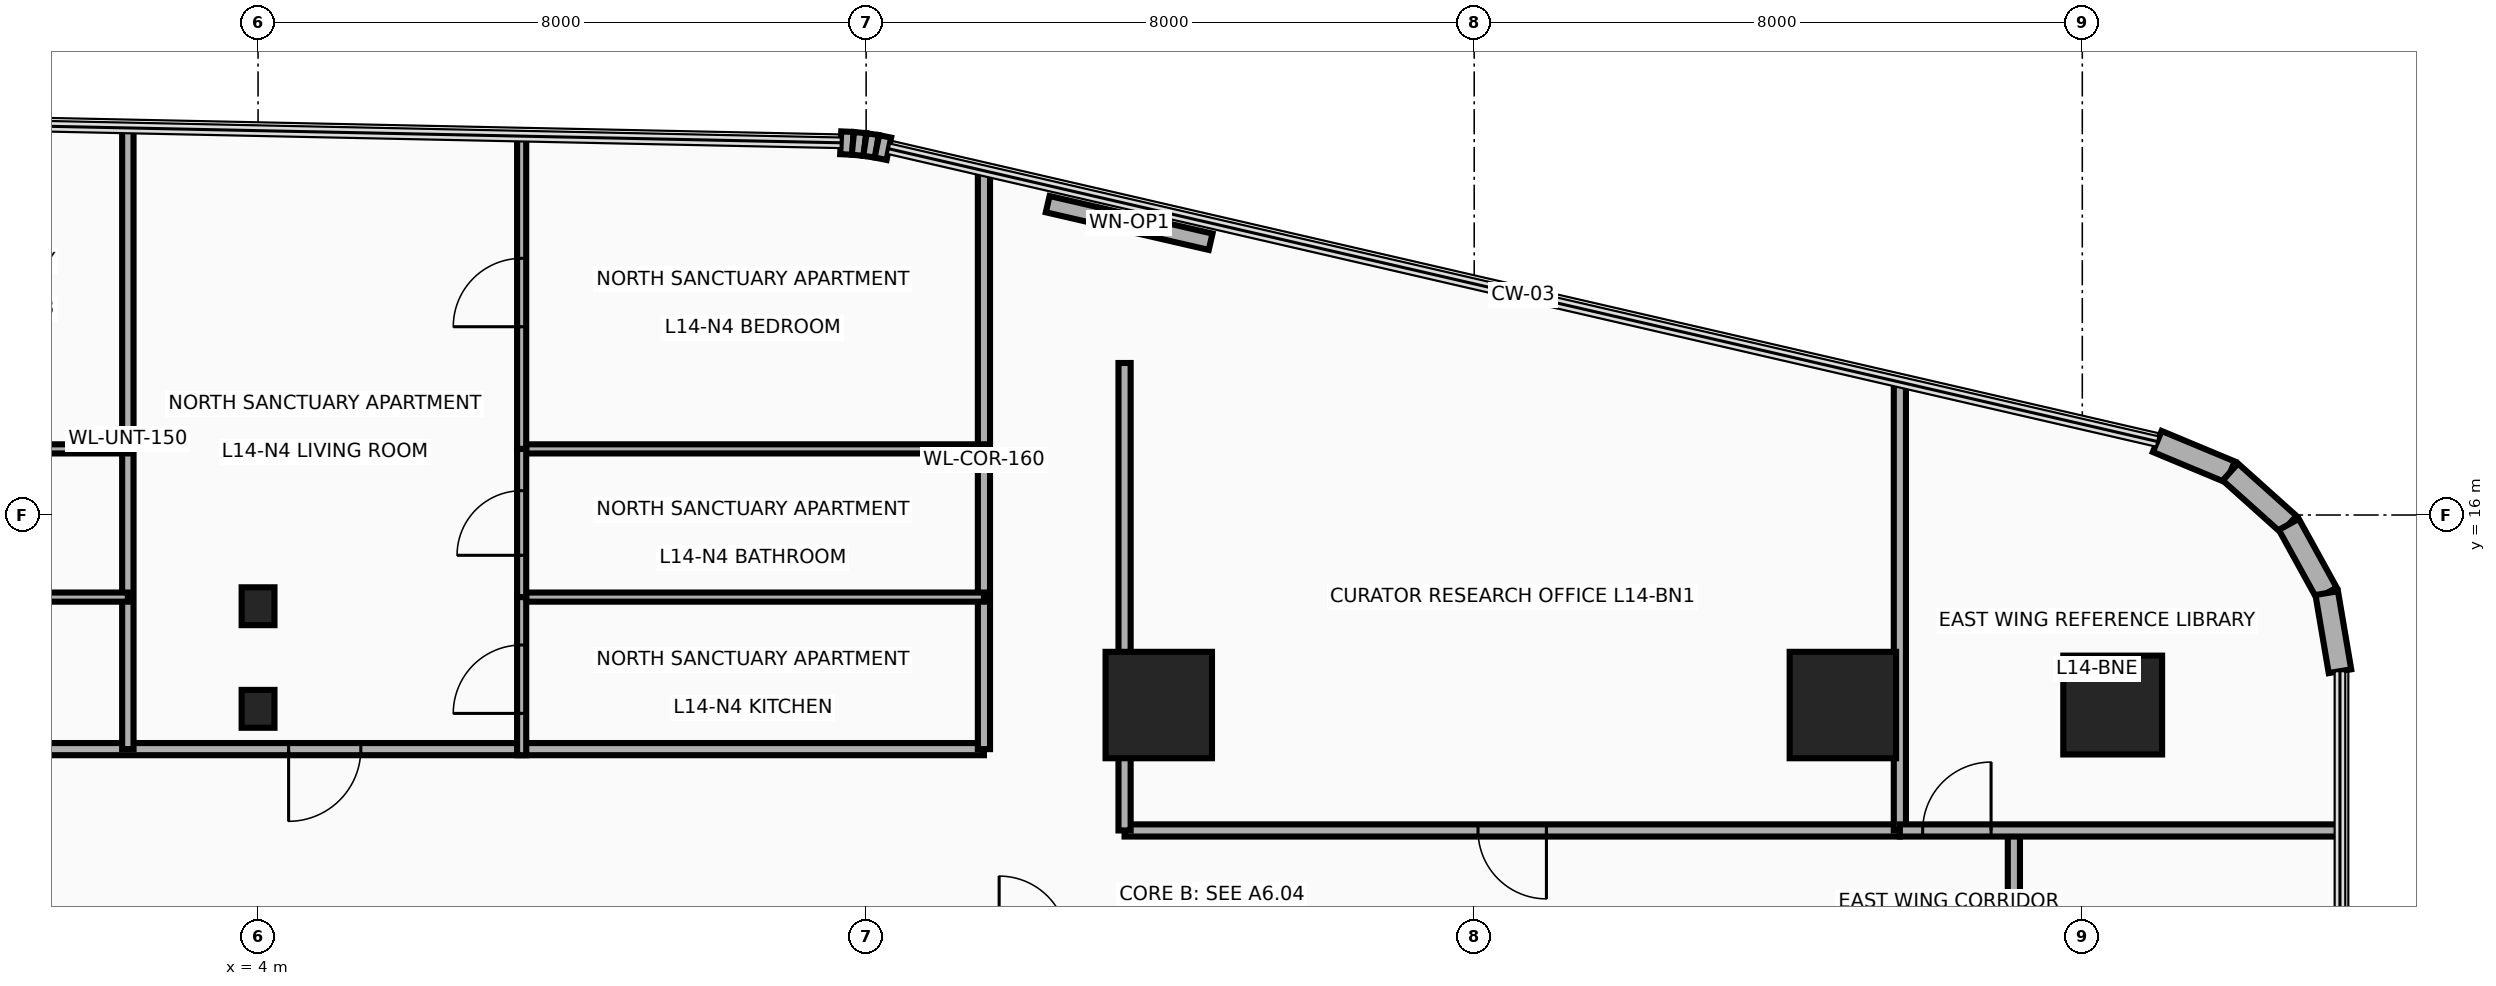
"""IFC4 building model, lengths in metres.
Left out: names, types, materials, properties, quantities, classifications, styles, units other than length and angle.
Written with IfcOpenShell. Run it as: python <this file> out.ifc"""

import sys

from ifc_helpers import new_model, si_unit, direction, frame, frame_2d, origin, origin_2d, place, context, subcontext, project, spatial, rectangle, circle, i_section, extrude, source, transform, mapped, element, fill, save


model = new_model("IFC4")
c1 = context("Model", 3, precision=1e-05, world=origin(), true_north=direction((0.0, 1.0)))
c2 = subcontext(c1, "Body", "Model", "MODEL_VIEW")
j1 = project(units=[si_unit("LENGTHUNIT", "METRE"), si_unit("PLANEANGLEUNIT", "RADIAN")], contexts=[c1])
p1 = place(None, origin())
s1 = spatial("IfcSite", under=j1, at=p1, CompositionType="ELEMENT")
p2 = place(p1, origin())
s2 = spatial("IfcBuilding", under=s1, at=p2, CompositionType="ELEMENT")
p3 = place(p2, frame((0.0, 0.0, 59.3)))
s3 = spatial("IfcBuildingStorey", under=s2, at=p3, CompositionType="ELEMENT", Elevation=59.3)
m1 = source(origin(), c2, "Body", "SweptSolid", [
    extrude(rectangle(XDim=1.4, YDim=1.4, at=origin_2d()), origin(), (0.0, 0.0, 1.0), 3.7),
])
for number, where, z_axis, x_axis in (
    (1, (15.85, 13.5, 0.0), (0.0, 0.0, 1.0), (1.0, 0.0, 0.0)),
    (2, (24.85, 13.5, 0.0), (0.0, 0.0, 1.0), (1.0, 0.0, 0.0)),
):
    element("IfcColumn", number, at=place(p3, frame(where, z_axis=z_axis, x_axis=x_axis)), inside=s3, PredefinedType="COLUMN", context=c2, shape_type="MappedRepresentation", body=[
        mapped(m1, transform((0.0, 0.0, 0.0), x_axis=(1.0, 0.0, 0.0), y_axis=(0.0, 1.0, 0.0), z_axis=(0.0, 0.0, 1.0), scale=1.0)),
    ])
m2 = source(origin(), c2, "Body", "SweptSolid", [
    extrude(circle(Radius=0.65, at=origin_2d()), origin(), (0.0, 0.0, 1.0), 3.7),
])
p4 = place(p3, frame((28.4, 13.5, 0.0), z_axis=(0.0, 0.0, 1.0), x_axis=(1.0, 0.0, 0.0)))
e3 = element("IfcColumn", 3, at=p4, inside=s3, PredefinedType="COLUMN", context=c2, shape_type="MappedRepresentation", body=[
    mapped(m2, transform((0.0, 0.0, 0.0), x_axis=(1.0, 0.0, 0.0), y_axis=(0.0, 1.0, 0.0), z_axis=(0.0, 0.0, 1.0), scale=1.0)),
])
m3 = source(origin(), c2, "Body", "SweptSolid", [
    extrude(i_section(OverallWidth=0.432, OverallDepth=0.498, WebThickness=0.056, FlangeThickness=0.089, at=origin_2d()), origin(), (0.0, 0.0, 1.0), 3.7),
])
for number, where, z_axis, x_axis in (
    (4, (4.0, 13.45, 0.0), (0.0, 0.0, 1.0), (1.0, 0.0, 0.0)),
    (5, (4.0, 14.8, 0.0), (0.0, 0.0, 1.0), (1.0, 0.0, 0.0)),
):
    element("IfcColumn", number, at=place(p3, frame(where, z_axis=z_axis, x_axis=x_axis)), inside=s3, PredefinedType="COLUMN", context=c2, shape_type="MappedRepresentation", body=[
        mapped(m3, transform((0.0, 0.0, 0.0), x_axis=(1.0, 0.0, 0.0), y_axis=(0.0, 1.0, 0.0), z_axis=(0.0, 0.0, 1.0), scale=1.0)),
    ])
p5 = place(p3, frame((11.666, 20.897, 0.0), z_axis=(0.0, 0.0, 1.0), x_axis=(0.998885297239, -0.047203421059, 0.0)))
e6 = element("IfcWall", 6, at=p5, inside=s3, PredefinedType="SOLIDWALL", context=c2, shape_type="SweptSolid", body=[
    extrude(rectangle(XDim=0.16, YDim=0.3, at=frame_2d((0.08, 0.0))), origin(), (0.0, 0.0, 1.0), 3.46),
])
p6 = place(p3, frame((11.826, 20.889, 0.0), z_axis=(0.0, 0.0, 1.0), x_axis=(0.995172891136, -0.098137234257, 0.0)))
e7 = element("IfcWall", 7, at=p6, inside=s3, PredefinedType="SOLIDWALL", context=c2, shape_type="SweptSolid", body=[
    extrude(rectangle(XDim=0.159, YDim=0.3, at=frame_2d((0.08, 0.0))), origin(), (0.0, 0.0, 1.0), 3.46),
])
p7 = place(p3, frame((11.984, 20.874, 0.0), z_axis=(0.0, 0.0, 1.0), x_axis=(0.988846069207, -0.148941100486, 0.0)))
e8 = element("IfcWall", 8, at=p7, inside=s3, PredefinedType="SOLIDWALL", context=c2, shape_type="SweptSolid", body=[
    extrude(rectangle(XDim=0.159, YDim=0.3, at=frame_2d((0.08, 0.0))), origin(), (0.0, 0.0, 1.0), 3.46),
])
p8 = place(p3, frame((12.142, 20.85, 0.0), z_axis=(0.0, 0.0, 1.0), x_axis=(0.979991950448, -0.19903712482, 0.0)))
e9 = element("IfcWall", 9, at=p8, inside=s3, PredefinedType="SOLIDWALL", context=c2, shape_type="SweptSolid", body=[
    extrude(rectangle(XDim=0.161, YDim=0.3, at=frame_2d((0.08, 0.0))), origin(), (0.0, 0.0, 1.0), 3.46),
])
p9 = place(p3, frame((14.389, 20.09, 0.0), z_axis=(0.0, 0.0, 1.0), x_axis=(0.974400545997, -0.224818984875, 0.0)))
e10 = element("IfcWall", 10, at=p9, inside=s3, PredefinedType="SOLIDWALL", context=c2, shape_type="SweptSolid", body=[
    extrude(rectangle(XDim=2.2, YDim=0.22, at=frame_2d((1.1, 0.0))), origin(), (0.0, 0.0, 1.0), 3.46),
])
p10 = place(p9, frame((0.65, 0.0, 0.95)))
e11 = element("IfcOpeningElement", 11, at=p10, cuts=e10, PredefinedType="OPENING", context=c2, shape_type="SweptSolid", body=[
    extrude(rectangle(XDim=0.9, YDim=1.3, at=frame_2d((0.45, 0.65))), frame((0.0, 0.125, 0.0), z_axis=(0.0, -1.0, 0.0), x_axis=(1.0, 0.0, 0.0)), (0.0, 0.0, 1.0), 0.25),
])
p11 = place(p3, frame((28.986, 16.967, 0.0), z_axis=(0.0, 0.0, 1.0), x_axis=(0.923083852684, -0.384598753136, 0.0)))
e12 = element("IfcWall", 12, at=p11, inside=s3, PredefinedType="SOLIDWALL", context=c2, shape_type="SweptSolid", body=[
    extrude(rectangle(XDim=1.042, YDim=0.3, at=frame_2d((0.521, 0.0))), origin(), (0.0, 0.0, 1.0), 3.46),
])
p12 = place(p3, frame((29.948, 16.566, 0.0), z_axis=(0.0, 0.0, 1.0), x_axis=(0.744585645533, -0.66752694063, 0.0)))
e13 = element("IfcWall", 13, at=p12, inside=s3, PredefinedType="SOLIDWALL", context=c2, shape_type="SweptSolid", body=[
    extrude(rectangle(XDim=1.033, YDim=0.3, at=frame_2d((0.517, 0.0))), origin(), (0.0, 0.0, 1.0), 3.46),
])
p13 = place(p3, frame((30.717, 15.877, 0.0), z_axis=(0.0, 0.0, 1.0), x_axis=(0.482971098131, -0.875636293429, 0.0)))
e14 = element("IfcWall", 14, at=p13, inside=s3, PredefinedType="SOLIDWALL", context=c2, shape_type="SweptSolid", body=[
    extrude(rectangle(XDim=1.033, YDim=0.3, at=frame_2d((0.516, 0.0))), origin(), (0.0, 0.0, 1.0), 3.46),
])
p14 = place(p3, frame((31.216, 14.973, 0.0), z_axis=(0.0, 0.0, 1.0), x_axis=(0.167019462117, -0.985953598946, 0.0)))
e15 = element("IfcWall", 15, at=p14, inside=s3, PredefinedType="SOLIDWALL", context=c2, shape_type="SweptSolid", body=[
    extrude(rectangle(XDim=1.042, YDim=0.3, at=frame_2d((0.521, 0.0))), origin(), (0.0, 0.0, 1.0), 3.46),
])
p15 = place(p3, frame((-31.89, 12.92, 0.0), z_axis=(0.0, 0.0, 1.0), x_axis=(1.0, 0.0, 0.0)))
e16 = element("IfcWall", 16, at=p15, inside=s3, PredefinedType="PARTITIONING", context=c2, shape_type="SweptSolid", body=[
    extrude(rectangle(XDim=45.44, YDim=0.16, at=frame_2d((22.72, 0.0))), origin(), (0.0, 0.0, 1.0), 2.583),
])
p16 = place(p15, frame((2.88, 0.0, 0.0)))
e17 = element("IfcOpeningElement", 17, at=p16, cuts=e16, PredefinedType="OPENING", context=c2, shape_type="SweptSolid", body=[
    extrude(rectangle(XDim=0.95, YDim=2.15, at=frame_2d((0.475, 1.075))), frame((0.0, 0.095, 0.0), z_axis=(0.0, -1.0, 0.0), x_axis=(1.0, 0.0, 0.0)), (0.0, 0.0, 1.0), 0.19),
])
p17 = place(p15, frame((13.768, 0.0, 0.0)))
e18 = element("IfcOpeningElement", 18, at=p17, cuts=e16, PredefinedType="OPENING", context=c2, shape_type="SweptSolid", body=[
    extrude(rectangle(XDim=0.95, YDim=2.15, at=frame_2d((0.475, 1.075))), frame((0.0, 0.095, 0.0), z_axis=(0.0, -1.0, 0.0), x_axis=(1.0, 0.0, 0.0)), (0.0, 0.0, 1.0), 0.19),
])
p18 = place(p15, frame((25.855, 0.0, 0.0)))
e19 = element("IfcOpeningElement", 19, at=p18, cuts=e16, PredefinedType="OPENING", context=c2, shape_type="SweptSolid", body=[
    extrude(rectangle(XDim=0.95, YDim=2.15, at=frame_2d((0.475, 1.075))), frame((0.0, 0.095, 0.0), z_axis=(0.0, -1.0, 0.0), x_axis=(1.0, 0.0, 0.0)), (0.0, 0.0, 1.0), 0.19),
])
p19 = place(p15, frame((36.292, 0.0, 0.0)))
e20 = element("IfcOpeningElement", 20, at=p19, cuts=e16, PredefinedType="OPENING", context=c2, shape_type="SweptSolid", body=[
    extrude(rectangle(XDim=0.95, YDim=2.15, at=frame_2d((0.475, 1.075))), frame((0.0, 0.095, 0.0), z_axis=(0.0, -1.0, 0.0), x_axis=(1.0, 0.0, 0.0)), (0.0, 0.0, 1.0), 0.19),
])
p20 = place(p3, frame((13.55, 12.92, 0.0), z_axis=(0.0, 0.0, 1.0), x_axis=(0.0, 1.0, 0.0)))
e21 = element("IfcWall", 21, at=p20, inside=s3, PredefinedType="PARTITIONING", context=c2, shape_type="SweptSolid", body=[
    extrude(rectangle(XDim=7.609, YDim=0.16, at=frame_2d((3.805, 0.0))), origin(), (0.0, 0.0, 1.0), 2.583),
])
p21 = place(p3, frame((2.287, 12.92, 0.0), z_axis=(0.0, 0.0, 1.0), x_axis=(0.0, 1.0, 0.0)))
e22 = element("IfcWall", 22, at=p21, inside=s3, PredefinedType="PARTITIONING", context=c2, shape_type="SweptSolid", body=[
    extrude(rectangle(XDim=8.172, YDim=0.15, at=frame_2d((4.086, 0.0))), origin(), (0.0, 0.0, 1.0), 2.583),
])
p22 = place(p3, frame((-2.145, 14.92, 0.0), z_axis=(0.0, 0.0, 1.0), x_axis=(1.0, 0.0, 0.0)))
e23 = element("IfcWall", 23, at=p22, inside=s3, PredefinedType="PARTITIONING", context=c2, shape_type="SweptSolid", body=[
    extrude(rectangle(XDim=4.432, YDim=0.12, at=frame_2d((2.216, 0.0))), origin(), (0.0, 0.0, 1.0), 2.583),
])
p23 = place(p3, frame((-2.145, 16.87, 0.0), z_axis=(0.0, 0.0, 1.0), x_axis=(1.0, 0.0, 0.0)))
e24 = element("IfcWall", 24, at=p23, inside=s3, PredefinedType="PARTITIONING", context=c2, shape_type="SweptSolid", body=[
    extrude(rectangle(XDim=4.432, YDim=0.12, at=frame_2d((2.216, 0.0))), origin(), (0.0, 0.0, 1.0), 3.46),
])
for number, where, z_axis, x_axis in (
    (25, (7.468, 14.92, 0.0), (0.0, 0.0, 1.0), (1.0, 0.0, 0.0)),
    (26, (7.468, 16.87, 0.0), (0.0, 0.0, 1.0), (1.0, 0.0, 0.0)),
):
    element("IfcWall", number, at=place(p3, frame(where, z_axis=z_axis, x_axis=x_axis)), inside=s3, PredefinedType="PARTITIONING", context=c2, shape_type="SweptSolid", body=[
        extrude(rectangle(XDim=6.082, YDim=0.12, at=frame_2d((3.041, 0.0))), origin(), (0.0, 0.0, 1.0), 3.46),
    ])
p24 = place(p3, frame((7.468, 14.92, 0.0), z_axis=(0.0, 0.0, 1.0), x_axis=(0.0, 1.0, 0.0)))
e27 = element("IfcWall", 27, at=p24, inside=s3, PredefinedType="PARTITIONING", context=c2, shape_type="SweptSolid", body=[
    extrude(rectangle(XDim=1.95, YDim=0.12, at=frame_2d((0.975, 0.0))), origin(), (0.0, 0.0, 1.0), 3.46),
])
p25 = place(p24, frame((0.55, 0.0, 0.0)))
e28 = element("IfcOpeningElement", 28, at=p25, cuts=e27, PredefinedType="OPENING", context=c2, shape_type="SweptSolid", body=[
    extrude(rectangle(XDim=0.85, YDim=2.1, at=frame_2d((0.425, 1.05))), frame((0.0, 0.075, 0.0), z_axis=(0.0, -1.0, 0.0), x_axis=(1.0, 0.0, 0.0)), (0.0, 0.0, 1.0), 0.15),
])
p26 = place(p3, frame((7.468, 12.84, 0.0), z_axis=(0.0, 0.0, 1.0), x_axis=(0.0, 1.0, 0.0)))
e29 = element("IfcWall", 29, at=p26, inside=s3, PredefinedType="PARTITIONING", context=c2, shape_type="SweptSolid", body=[
    extrude(rectangle(XDim=2.08, YDim=0.12, at=frame_2d((1.04, 0.0))), origin(), (0.0, 0.0, 1.0), 2.583),
])
p27 = place(p26, frame((0.55, 0.0, 0.0)))
e30 = element("IfcOpeningElement", 30, at=p27, cuts=e29, PredefinedType="OPENING", context=c2, shape_type="SweptSolid", body=[
    extrude(rectangle(XDim=0.9, YDim=2.1, at=frame_2d((0.45, 1.05))), frame((0.0, 0.075, 0.0), z_axis=(0.0, -1.0, 0.0), x_axis=(1.0, 0.0, 0.0)), (0.0, 0.0, 1.0), 0.15),
])
p28 = place(p3, frame((7.468, 16.87, 0.0), z_axis=(0.0, 0.0, 1.0), x_axis=(0.0, 1.0, 0.0)))
e31 = element("IfcWall", 31, at=p28, inside=s3, PredefinedType="PARTITIONING", context=c2, shape_type="SweptSolid", body=[
    extrude(rectangle(XDim=4.114, YDim=0.12, at=frame_2d((2.057, 0.0))), origin(), (0.0, 0.0, 1.0), 3.46),
])
p29 = place(p28, frame((1.607, 0.0, 0.0)))
e32 = element("IfcOpeningElement", 32, at=p29, cuts=e31, PredefinedType="OPENING", context=c2, shape_type="SweptSolid", body=[
    extrude(rectangle(XDim=0.9, YDim=2.1, at=frame_2d((0.45, 1.05))), frame((0.0, 0.075, 0.0), z_axis=(0.0, -1.0, 0.0), x_axis=(1.0, 0.0, 0.0)), (0.0, 0.0, 1.0), 0.15),
])
p30 = place(p3, frame((15.4, 11.85, 0.0), z_axis=(0.0, 0.0, 1.0), x_axis=(1.0, 0.0, 0.0)))
e33 = element("IfcWall", 33, at=p30, inside=s3, PredefinedType="PARTITIONING", context=c2, shape_type="SweptSolid", body=[
    extrude(rectangle(XDim=10.2, YDim=0.16, at=frame_2d((5.1, 0.0))), origin(), (0.0, 0.0, 1.0), 2.834),
])
p31 = place(p30, frame((4.65, 0.0, 0.0)))
e34 = element("IfcOpeningElement", 34, at=p31, cuts=e33, PredefinedType="OPENING", context=c2, shape_type="SweptSolid", body=[
    extrude(rectangle(XDim=0.9, YDim=2.1, at=frame_2d((0.45, 1.05))), frame((0.0, 0.095, 0.0), z_axis=(0.0, -1.0, 0.0), x_axis=(1.0, 0.0, 0.0)), (0.0, 0.0, 1.0), 0.19),
])
p32 = place(p3, frame((15.4, 11.85, 0.0), z_axis=(0.0, 0.0, 1.0), x_axis=(0.0, 1.0, 0.0)))
e35 = element("IfcWall", 35, at=p32, inside=s3, PredefinedType="PARTITIONING", context=c2, shape_type="SweptSolid", body=[
    extrude(rectangle(XDim=6.15, YDim=0.16, at=frame_2d((3.075, 0.0))), origin(), (0.0, 0.0, 1.0), 2.583),
])
p33 = place(p3, frame((25.6, 11.85, 0.0), z_axis=(0.0, 0.0, 1.0), x_axis=(0.0, 1.0, 0.0)))
e36 = element("IfcWall", 36, at=p33, inside=s3, PredefinedType="PARTITIONING", context=c2, shape_type="SweptSolid", body=[
    extrude(rectangle(XDim=5.898, YDim=0.16, at=frame_2d((2.949, 0.0))), origin(), (0.0, 0.0, 1.0), 2.583),
])
p34 = place(p3, frame((27.1, -13.89, 0.0), z_axis=(0.0, 0.0, 1.0), x_axis=(0.0, 1.0, 0.0)))
e37 = element("IfcWall", 37, at=p34, inside=s3, PredefinedType="PARTITIONING", context=c2, shape_type="SweptSolid", body=[
    extrude(rectangle(XDim=25.74, YDim=0.16, at=frame_2d((12.87, 0.0))), origin(), (0.0, 0.0, 1.0), 2.583),
])
p35 = place(p34, frame((1.76, 0.0, 0.0)))
e38 = element("IfcOpeningElement", 38, at=p35, cuts=e37, PredefinedType="OPENING", context=c2, shape_type="SweptSolid", body=[
    extrude(rectangle(XDim=1.8, YDim=2.15, at=frame_2d((0.9, 1.075))), frame((0.0, 0.095, 0.0), z_axis=(0.0, -1.0, 0.0), x_axis=(1.0, 0.0, 0.0)), (0.0, 0.0, 1.0), 0.19),
])
p36 = place(p34, frame((12.16, 0.0, 0.0)))
e39 = element("IfcOpeningElement", 39, at=p36, cuts=e37, PredefinedType="OPENING", context=c2, shape_type="SweptSolid", body=[
    extrude(rectangle(XDim=1.8, YDim=2.15, at=frame_2d((0.9, 1.075))), frame((0.0, 0.095, 0.0), z_axis=(0.0, -1.0, 0.0), x_axis=(1.0, 0.0, 0.0)), (0.0, 0.0, 1.0), 0.19),
])
p37 = place(p34, frame((20.365, 0.0, 0.0)))
e40 = element("IfcOpeningElement", 40, at=p37, cuts=e37, PredefinedType="OPENING", context=c2, shape_type="SweptSolid", body=[
    extrude(rectangle(XDim=1.8, YDim=2.15, at=frame_2d((0.9, 1.075))), frame((0.0, 0.095, 0.0), z_axis=(0.0, -1.0, 0.0), x_axis=(1.0, 0.0, 0.0)), (0.0, 0.0, 1.0), 0.19),
])
p38 = place(p3, frame((25.6, 11.85, 0.0), z_axis=(0.0, 0.0, 1.0), x_axis=(1.0, 0.0, 0.0)))
e41 = element("IfcWall", 41, at=p38, inside=s3, PredefinedType="PARTITIONING", context=c2, shape_type="SweptSolid", body=[
    extrude(rectangle(XDim=5.79, YDim=0.16, at=frame_2d((2.895, 0.0))), origin(), (0.0, 0.0, 1.0), 2.896),
])
p39 = place(p38, frame((0.3, 0.0, 0.0)))
e42 = element("IfcOpeningElement", 42, at=p39, cuts=e41, PredefinedType="OPENING", context=c2, shape_type="SweptSolid", body=[
    extrude(rectangle(XDim=0.9, YDim=2.1, at=frame_2d((0.45, 1.05))), frame((0.0, 0.095, 0.0), z_axis=(0.0, -1.0, 0.0), x_axis=(1.0, 0.0, 0.0)), (0.0, 0.0, 1.0), 0.19),
])
p40 = place(p10, origin())
e43 = element("IfcWindow", 43, at=p40, inside=s3, PartitioningType="SINGLE_PANEL", PredefinedType="WINDOW", context=c2, shape_type="SweptSolid", body=[
    extrude(rectangle(XDim=0.9, YDim=1.3, at=frame_2d((0.45, 0.65))), frame((0.0, 0.03, 0.0), z_axis=(0.0, -1.0, 0.0), x_axis=(1.0, 0.0, 0.0)), (0.0, 0.0, 1.0), 0.06),
])
fill(e11, e43)
p41 = place(p19, frame((0.95, 0.0, 0.0), z_axis=(0.0, 0.0, 1.0), x_axis=(-1.0, 0.0, 0.0)))
e44 = element("IfcDoor", 44, at=p41, inside=s3, OperationType="SINGLE_SWING_LEFT", PredefinedType="DOOR", context=c2, shape_type="SweptSolid", body=[
    extrude(rectangle(XDim=0.95, YDim=2.15, at=frame_2d((0.475, 1.075))), frame((0.0, 0.025, 0.0), z_axis=(0.0, -1.0, 0.0), x_axis=(1.0, 0.0, 0.0)), (0.0, 0.0, 1.0), 0.05),
])
fill(e20, e44)
p42 = place(p25, origin())
e45 = element("IfcDoor", 45, at=p42, inside=s3, OperationType="SINGLE_SWING_RIGHT", PredefinedType="DOOR", context=c2, shape_type="SweptSolid", body=[
    extrude(rectangle(XDim=0.85, YDim=2.1, at=frame_2d((0.425, 1.05))), frame((0.0, 0.025, 0.0), z_axis=(0.0, -1.0, 0.0), x_axis=(1.0, 0.0, 0.0)), (0.0, 0.0, 1.0), 0.05),
])
fill(e28, e45)
p43 = place(p27, origin())
e46 = element("IfcDoor", 46, at=p43, inside=s3, OperationType="SINGLE_SWING_LEFT", PredefinedType="DOOR", context=c2, shape_type="SweptSolid", body=[
    extrude(rectangle(XDim=0.9, YDim=2.1, at=frame_2d((0.45, 1.05))), frame((0.0, 0.025, 0.0), z_axis=(0.0, -1.0, 0.0), x_axis=(1.0, 0.0, 0.0)), (0.0, 0.0, 1.0), 0.05),
])
fill(e30, e46)
p44 = place(p29, origin())
e47 = element("IfcDoor", 47, at=p44, inside=s3, OperationType="SINGLE_SWING_RIGHT", PredefinedType="DOOR", context=c2, shape_type="SweptSolid", body=[
    extrude(rectangle(XDim=0.9, YDim=2.1, at=frame_2d((0.45, 1.05))), frame((0.0, 0.025, 0.0), z_axis=(0.0, -1.0, 0.0), x_axis=(1.0, 0.0, 0.0)), (0.0, 0.0, 1.0), 0.05),
])
fill(e32, e47)
p45 = place(p31, frame((0.9, 0.0, 0.0), z_axis=(0.0, 0.0, 1.0), x_axis=(-1.0, 0.0, 0.0)))
e48 = element("IfcDoor", 48, at=p45, inside=s3, OperationType="SINGLE_SWING_LEFT", PredefinedType="DOOR", context=c2, shape_type="SweptSolid", body=[
    extrude(rectangle(XDim=0.9, YDim=2.1, at=frame_2d((0.45, 1.05))), frame((0.0, 0.025, 0.0), z_axis=(0.0, -1.0, 0.0), x_axis=(1.0, 0.0, 0.0)), (0.0, 0.0, 1.0), 0.05),
])
fill(e34, e48)
p46 = place(p39, origin())
e49 = element("IfcDoor", 49, at=p46, inside=s3, OperationType="SINGLE_SWING_RIGHT", PredefinedType="DOOR", context=c2, shape_type="SweptSolid", body=[
    extrude(rectangle(XDim=0.9, YDim=2.1, at=frame_2d((0.45, 1.05))), frame((0.0, 0.025, 0.0), z_axis=(0.0, -1.0, 0.0), x_axis=(1.0, 0.0, 0.0)), (0.0, 0.0, 1.0), 0.05),
])
fill(e42, e49)
save(model, sys.argv[1])
